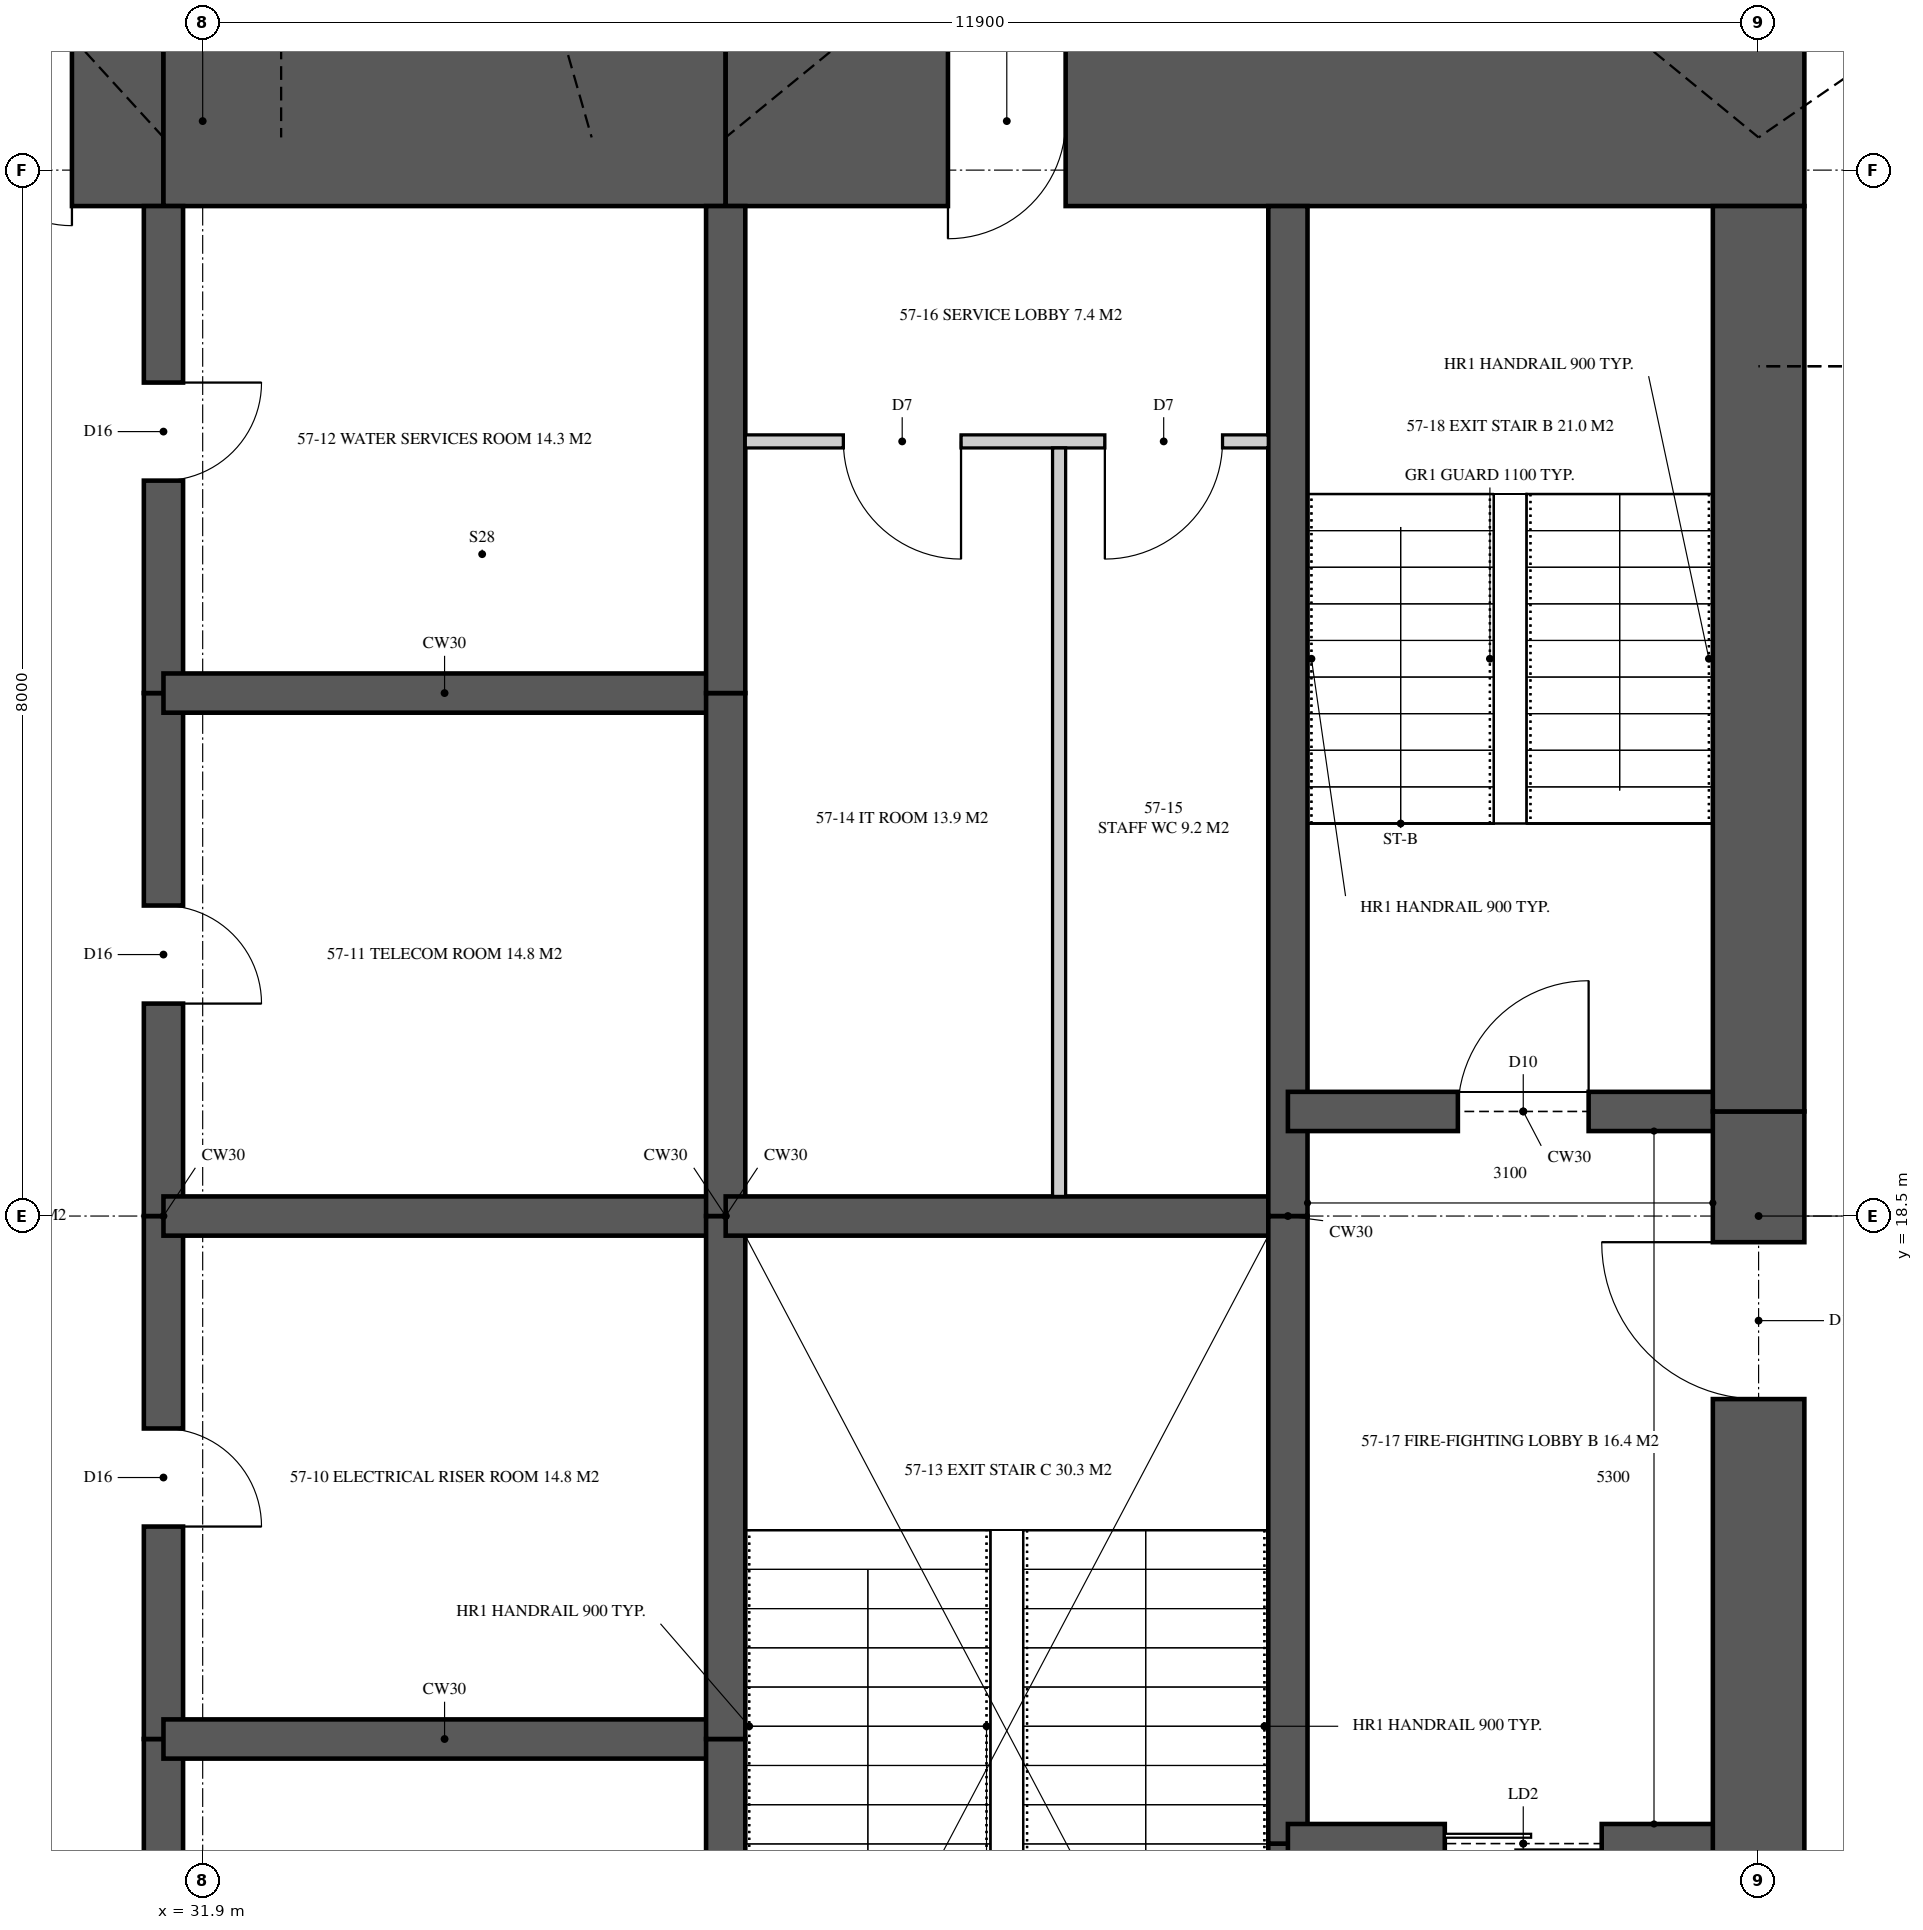
"""IFC4 building model, lengths in metres.
Left out: names, types, materials, properties, quantities, classifications, styles, units other than length and angle.
Written with IfcOpenShell. Run it as: python <this file> out.ifc"""

import sys

from ifc_helpers import new_model, si_unit, direction, frame, frame_2d, origin, place, context, subcontext, project, spatial, rectangle, extrude, element, fill, save


model = new_model("IFC4")
c1 = context("Model", 3, precision=1e-05, world=origin(), true_north=direction((0.0, 1.0)))
c2 = subcontext(c1, "Body", "Model", "MODEL_VIEW")
j1 = project(units=[si_unit("LENGTHUNIT", "METRE"), si_unit("PLANEANGLEUNIT", "RADIAN")], contexts=[c1])
p1 = place(None, origin())
s1 = spatial("IfcSite", under=j1, at=p1, CompositionType="ELEMENT")
p2 = place(p1, origin())
s2 = spatial("IfcBuilding", under=s1, at=p2, CompositionType="ELEMENT")
p3 = place(p2, frame((0.0, 0.0, 207.95)))
s3 = spatial("IfcBuildingStorey", under=s2, at=p3, CompositionType="ELEMENT", Elevation=207.95)
p4 = place(p3, frame((44.15, 26.875, 0.0), z_axis=(0.0, 0.0, 1.0), x_axis=(-1.0, 0.0, 0.0)))
e1 = element("IfcWall", 1, at=p4, inside=s3, PredefinedType="SHEAR", context=c2, shape_type="SweptSolid", body=[
    extrude(rectangle(XDim=8.25, YDim=1.3, at=frame_2d((4.125, 0.0))), origin(), (0.0, 0.0, 1.0), 5.0),
])
p5 = place(p4, frame((5.65, 0.0, 0.0)))
e2 = element("IfcOpeningElement", 2, at=p5, cuts=e1, PredefinedType="OPENING", context=c2, shape_type="SweptSolid", body=[
    extrude(rectangle(XDim=0.9, YDim=2.1, at=frame_2d((0.45, 1.05))), frame((0.0, 0.66, 0.0), z_axis=(0.0, -1.0, 0.0), x_axis=(1.0, 0.0, 0.0)), (0.0, 0.0, 1.0), 1.32),
])
p6 = place(p3, frame((35.9, 26.875, 0.0), z_axis=(0.0, 0.0, 1.0), x_axis=(-1.0, 0.0, 0.0)))
e3 = element("IfcWall", 3, at=p6, inside=s3, PredefinedType="SHEAR", context=c2, shape_type="SweptSolid", body=[
    extrude(rectangle(XDim=4.3, YDim=1.3, at=frame_2d((2.15, 0.0))), origin(), (0.0, 0.0, 1.0), 5.0),
])
p7 = place(p3, frame((31.6, 26.875, 0.0), z_axis=(0.0, 0.0, 1.0), x_axis=(-1.0, 0.0, 0.0)))
e4 = element("IfcWall", 4, at=p7, inside=s3, PredefinedType="SHEAR", context=c2, shape_type="SweptSolid", body=[
    extrude(rectangle(XDim=5.6, YDim=1.3, at=frame_2d((2.8, 0.0))), origin(), (0.0, 0.0, 1.0), 5.0),
])
p8 = place(p7, frame((0.7, 0.0, 0.0)))
e5 = element("IfcOpeningElement", 5, at=p8, cuts=e4, PredefinedType="OPENING", context=c2, shape_type="SweptSolid", body=[
    extrude(rectangle(XDim=1.6, YDim=2.1, at=frame_2d((0.8, 1.05))), frame((0.0, 0.66, 0.0), z_axis=(0.0, -1.0, 0.0), x_axis=(1.0, 0.0, 0.0)), (0.0, 0.0, 1.0), 1.32),
])
p9 = place(p3, frame((43.8, 13.0, 0.0), z_axis=(0.0, 0.0, 1.0), x_axis=(0.0, 1.0, 0.0)))
e6 = element("IfcWall", 6, at=p9, inside=s3, PredefinedType="SHEAR", context=c2, shape_type="SweptSolid", body=[
    extrude(rectangle(XDim=6.3, YDim=0.7, at=frame_2d((3.15, 0.0))), origin(), (0.0, 0.0, 1.0), 5.0),
])
p10 = place(p9, frame((4.1, 0.0, 0.0)))
e7 = element("IfcOpeningElement", 7, at=p10, cuts=e6, PredefinedType="OPENING", context=c2, shape_type="SweptSolid", body=[
    extrude(rectangle(XDim=1.2, YDim=2.2, at=frame_2d((0.6, 1.1))), frame((0.0, 0.36, 0.0), z_axis=(0.0, -1.0, 0.0), x_axis=(1.0, 0.0, 0.0)), (0.0, 0.0, 1.0), 0.72),
])
p11 = place(p3, frame((43.8, 19.3, 0.0), z_axis=(0.0, 0.0, 1.0), x_axis=(0.0, 1.0, 0.0)))
e8 = element("IfcWall", 8, at=p11, inside=s3, PredefinedType="SHEAR", context=c2, shape_type="SweptSolid", body=[
    extrude(rectangle(XDim=6.925, YDim=0.7, at=frame_2d((3.462, 0.0))), origin(), (0.0, 0.0, 1.0), 5.0),
])
p12 = place(p3, frame((31.6, 10.775, 0.0), z_axis=(0.0, 0.0, 1.0), x_axis=(0.0, 1.0, 0.0)))
e9 = element("IfcWall", 9, at=p12, inside=s3, PredefinedType="SHEAR", context=c2, shape_type="SweptSolid", body=[
    extrude(rectangle(XDim=3.725, YDim=0.3, at=frame_2d((1.863, 0.0))), origin(), (0.0, 0.0, 1.0), 5.0),
])
p13 = place(p12, frame((1.35, 0.0, 0.0)))
e10 = element("IfcOpeningElement", 10, at=p13, cuts=e9, PredefinedType="OPENING", context=c2, shape_type="SweptSolid", body=[
    extrude(rectangle(XDim=0.75, YDim=2.1, at=frame_2d((0.375, 1.05))), frame((0.0, 0.16, 0.0), z_axis=(0.0, -1.0, 0.0), x_axis=(1.0, 0.0, 0.0)), (0.0, 0.0, 1.0), 0.32),
])
p14 = place(p3, frame((31.6, 14.5, 0.0), z_axis=(0.0, 0.0, 1.0), x_axis=(0.0, 1.0, 0.0)))
e11 = element("IfcWall", 11, at=p14, inside=s3, PredefinedType="SHEAR", context=c2, shape_type="SweptSolid", body=[
    extrude(rectangle(XDim=4.0, YDim=0.3, at=frame_2d((2.0, 0.0))), origin(), (0.0, 0.0, 1.0), 5.0),
])
p15 = place(p14, frame((1.625, 0.0, 0.0)))
e12 = element("IfcOpeningElement", 12, at=p15, cuts=e11, PredefinedType="OPENING", context=c2, shape_type="SweptSolid", body=[
    extrude(rectangle(XDim=0.75, YDim=2.1, at=frame_2d((0.375, 1.05))), frame((0.0, 0.16, 0.0), z_axis=(0.0, -1.0, 0.0), x_axis=(1.0, 0.0, 0.0)), (0.0, 0.0, 1.0), 0.32),
])
p16 = place(p3, frame((31.6, 18.5, 0.0), z_axis=(0.0, 0.0, 1.0), x_axis=(0.0, 1.0, 0.0)))
e13 = element("IfcWall", 13, at=p16, inside=s3, PredefinedType="SHEAR", context=c2, shape_type="SweptSolid", body=[
    extrude(rectangle(XDim=4.0, YDim=0.3, at=frame_2d((2.0, 0.0))), origin(), (0.0, 0.0, 1.0), 5.0),
])
p17 = place(p16, frame((1.625, 0.0, 0.0)))
e14 = element("IfcOpeningElement", 14, at=p17, cuts=e13, PredefinedType="OPENING", context=c2, shape_type="SweptSolid", body=[
    extrude(rectangle(XDim=0.75, YDim=2.1, at=frame_2d((0.375, 1.05))), frame((0.0, 0.16, 0.0), z_axis=(0.0, -1.0, 0.0), x_axis=(1.0, 0.0, 0.0)), (0.0, 0.0, 1.0), 0.32),
])
p18 = place(p3, frame((31.6, 22.5, 0.0), z_axis=(0.0, 0.0, 1.0), x_axis=(0.0, 1.0, 0.0)))
e15 = element("IfcWall", 15, at=p18, inside=s3, PredefinedType="SHEAR", context=c2, shape_type="SweptSolid", body=[
    extrude(rectangle(XDim=3.725, YDim=0.3, at=frame_2d((1.863, 0.0))), origin(), (0.0, 0.0, 1.0), 5.0),
])
p19 = place(p18, frame((1.625, 0.0, 0.0)))
e16 = element("IfcOpeningElement", 16, at=p19, cuts=e15, PredefinedType="OPENING", context=c2, shape_type="SweptSolid", body=[
    extrude(rectangle(XDim=0.75, YDim=2.1, at=frame_2d((0.375, 1.05))), frame((0.0, 0.16, 0.0), z_axis=(0.0, -1.0, 0.0), x_axis=(1.0, 0.0, 0.0)), (0.0, 0.0, 1.0), 0.32),
])
p20 = place(p3, frame((35.9, 10.775, 0.0), z_axis=(0.0, 0.0, 1.0), x_axis=(0.0, 1.0, 0.0)))
e17 = element("IfcWall", 17, at=p20, inside=s3, PredefinedType="SHEAR", context=c2, shape_type="SweptSolid", body=[
    extrude(rectangle(XDim=3.725, YDim=0.3, at=frame_2d((1.863, 0.0))), origin(), (0.0, 0.0, 1.0), 5.0),
])
for number, where, z_axis, x_axis in (
    (18, (35.9, 14.5, 0.0), (0.0, 0.0, 1.0), (0.0, 1.0, 0.0)),
    (19, (35.9, 18.5, 0.0), (0.0, 0.0, 1.0), (0.0, 1.0, 0.0)),
):
    element("IfcWall", number, at=place(p3, frame(where, z_axis=z_axis, x_axis=x_axis)), inside=s3, PredefinedType="SHEAR", context=c2, shape_type="SweptSolid", body=[
        extrude(rectangle(XDim=4.0, YDim=0.3, at=frame_2d((2.0, 0.0))), origin(), (0.0, 0.0, 1.0), 5.0),
    ])
p21 = place(p3, frame((35.9, 22.5, 0.0), z_axis=(0.0, 0.0, 1.0), x_axis=(0.0, 1.0, 0.0)))
e20 = element("IfcWall", 20, at=p21, inside=s3, PredefinedType="SHEAR", context=c2, shape_type="SweptSolid", body=[
    extrude(rectangle(XDim=3.725, YDim=0.3, at=frame_2d((1.863, 0.0))), origin(), (0.0, 0.0, 1.0), 5.0),
])
p22 = place(p3, frame((40.2, 10.775, 0.0), z_axis=(0.0, 0.0, 1.0), x_axis=(0.0, 1.0, 0.0)))
e21 = element("IfcWall", 21, at=p22, inside=s3, PredefinedType="SHEAR", context=c2, shape_type="SweptSolid", body=[
    extrude(rectangle(XDim=2.925, YDim=0.3, at=frame_2d((1.462, 0.0))), origin(), (0.0, 0.0, 1.0), 5.0),
])
p23 = place(p3, frame((40.2, 13.7, 0.0), z_axis=(0.0, 0.0, 1.0), x_axis=(0.0, 1.0, 0.0)))
e22 = element("IfcWall", 22, at=p23, inside=s3, PredefinedType="SHEAR", context=c2, shape_type="SweptSolid", body=[
    extrude(rectangle(XDim=4.8, YDim=0.3, at=frame_2d((2.4, 0.0))), origin(), (0.0, 0.0, 1.0), 5.0),
])
p24 = place(p3, frame((40.2, 18.5, 0.0), z_axis=(0.0, 0.0, 1.0), x_axis=(0.0, 1.0, 0.0)))
e23 = element("IfcWall", 23, at=p24, inside=s3, PredefinedType="SHEAR", context=c2, shape_type="SweptSolid", body=[
    extrude(rectangle(XDim=7.725, YDim=0.3, at=frame_2d((3.863, 0.0))), origin(), (0.0, 0.0, 1.0), 5.0),
])
for number, where, z_axis, x_axis in (
    (24, (31.6, 14.5, 0.0), (0.0, 0.0, 1.0), (1.0, 0.0, 0.0)),
    (25, (31.6, 18.5, 0.0), (0.0, 0.0, 1.0), (1.0, 0.0, 0.0)),
    (26, (31.6, 22.5, 0.0), (0.0, 0.0, 1.0), (1.0, 0.0, 0.0)),
):
    element("IfcWall", number, at=place(p3, frame(where, z_axis=z_axis, x_axis=x_axis)), inside=s3, PredefinedType="SHEAR", context=c2, shape_type="SweptSolid", body=[
        extrude(rectangle(XDim=4.3, YDim=0.3, at=frame_2d((2.15, 0.0))), origin(), (0.0, 0.0, 1.0), 5.0),
    ])
p25 = place(p3, frame((35.9, 18.5, 0.0), z_axis=(0.0, 0.0, 1.0), x_axis=(1.0, 0.0, 0.0)))
e27 = element("IfcWall", 27, at=p25, inside=s3, PredefinedType="SHEAR", context=c2, shape_type="SweptSolid", body=[
    extrude(rectangle(XDim=4.3, YDim=0.3, at=frame_2d((2.15, 0.0))), origin(), (0.0, 0.0, 1.0), 5.0),
])
p26 = place(p3, frame((40.2, 13.7, 0.0), z_axis=(0.0, 0.0, 1.0), x_axis=(1.0, 0.0, 0.0)))
e28 = element("IfcWall", 28, at=p26, inside=s3, PredefinedType="SHEAR", context=c2, shape_type="SweptSolid", body=[
    extrude(rectangle(XDim=3.6, YDim=0.3, at=frame_2d((1.8, 0.0))), origin(), (0.0, 0.0, 1.0), 5.0),
])
p27 = place(p26, frame((1.2, 0.0, 0.0)))
e29 = element("IfcOpeningElement", 29, at=p27, cuts=e28, PredefinedType="OPENING", context=c2, shape_type="SweptSolid", body=[
    extrude(rectangle(XDim=1.2, YDim=2.1, at=frame_2d((0.6, 1.05))), frame((0.0, 0.16, 0.0), z_axis=(0.0, -1.0, 0.0), x_axis=(1.0, 0.0, 0.0)), (0.0, 0.0, 1.0), 0.32),
])
p28 = place(p3, frame((40.2, 19.3, 0.0), z_axis=(0.0, 0.0, 1.0), x_axis=(1.0, 0.0, 0.0)))
e30 = element("IfcWall", 30, at=p28, inside=s3, PredefinedType="SHEAR", context=c2, shape_type="SweptSolid", body=[
    extrude(rectangle(XDim=3.6, YDim=0.3, at=frame_2d((1.8, 0.0))), origin(), (0.0, 0.0, 1.0), 5.0),
])
p29 = place(p28, frame((1.3, 0.0, 0.0)))
e31 = element("IfcOpeningElement", 31, at=p29, cuts=e30, PredefinedType="OPENING", context=c2, shape_type="SweptSolid", body=[
    extrude(rectangle(XDim=1.0, YDim=2.1, at=frame_2d((0.5, 1.05))), frame((0.0, 0.16, 0.0), z_axis=(0.0, -1.0, 0.0), x_axis=(1.0, 0.0, 0.0)), (0.0, 0.0, 1.0), 0.32),
])
p30 = place(p3, frame((36.05, 24.425, 0.0), z_axis=(0.0, 0.0, 1.0), x_axis=(1.0, 0.0, 0.0)))
e32 = element("IfcWall", 32, at=p30, inside=s3, PredefinedType="PARTITIONING", context=c2, shape_type="SweptSolid", body=[
    extrude(rectangle(XDim=4.0, YDim=0.1, at=frame_2d((2.0, 0.0))), origin(), (0.0, 0.0, 1.0), 4.72),
])
p31 = place(p30, frame((0.75, 0.0, 0.0)))
e33 = element("IfcOpeningElement", 33, at=p31, cuts=e32, PredefinedType="OPENING", context=c2, shape_type="SweptSolid", body=[
    extrude(rectangle(XDim=0.9, YDim=2.1, at=frame_2d((0.45, 1.05))), frame((0.0, 0.06, 0.0), z_axis=(0.0, -1.0, 0.0), x_axis=(1.0, 0.0, 0.0)), (0.0, 0.0, 1.0), 0.12),
])
p32 = place(p30, frame((2.75, 0.0, 0.0)))
e34 = element("IfcOpeningElement", 34, at=p32, cuts=e32, PredefinedType="OPENING", context=c2, shape_type="SweptSolid", body=[
    extrude(rectangle(XDim=0.9, YDim=2.1, at=frame_2d((0.45, 1.05))), frame((0.0, 0.06, 0.0), z_axis=(0.0, -1.0, 0.0), x_axis=(1.0, 0.0, 0.0)), (0.0, 0.0, 1.0), 0.12),
])
p33 = place(p3, frame((38.45, 18.65, 0.0), z_axis=(0.0, 0.0, 1.0), x_axis=(0.0, 1.0, 0.0)))
e35 = element("IfcWall", 35, at=p33, inside=s3, PredefinedType="PARTITIONING", context=c2, shape_type="SweptSolid", body=[
    extrude(rectangle(XDim=5.725, YDim=0.1, at=frame_2d((2.863, 0.0))), origin(), (0.0, 0.0, 1.0), 4.72),
])
p34 = place(p31, frame((0.9, 0.0, 0.0), z_axis=(0.0, 0.0, 1.0), x_axis=(-1.0, 0.0, 0.0)))
e36 = element("IfcDoor", 36, at=p34, inside=s3, OperationType="SINGLE_SWING_LEFT", PredefinedType="DOOR", context=c2, shape_type="SweptSolid", body=[
    extrude(rectangle(XDim=0.9, YDim=2.1, at=frame_2d((0.45, 1.05))), frame((0.0, 0.025, 0.0), z_axis=(0.0, -1.0, 0.0), x_axis=(1.0, 0.0, 0.0)), (0.0, 0.0, 1.0), 0.05),
])
fill(e33, e36)
p35 = place(p32, frame((0.9, 0.0, 0.0), z_axis=(0.0, 0.0, 1.0), x_axis=(-1.0, 0.0, 0.0)))
e37 = element("IfcDoor", 37, at=p35, inside=s3, OperationType="SINGLE_SWING_RIGHT", PredefinedType="DOOR", context=c2, shape_type="SweptSolid", body=[
    extrude(rectangle(XDim=0.9, YDim=2.1, at=frame_2d((0.45, 1.05))), frame((0.0, 0.025, 0.0), z_axis=(0.0, -1.0, 0.0), x_axis=(1.0, 0.0, 0.0)), (0.0, 0.0, 1.0), 0.05),
])
fill(e34, e37)
p36 = place(p29, origin())
e38 = element("IfcDoor", 38, at=p36, inside=s3, OperationType="SINGLE_SWING_RIGHT", PredefinedType="DOOR", context=c2, shape_type="SweptSolid", body=[
    extrude(rectangle(XDim=1.0, YDim=2.1, at=frame_2d((0.5, 1.05))), frame((0.0, 0.025, 0.0), z_axis=(0.0, -1.0, 0.0), x_axis=(1.0, 0.0, 0.0)), (0.0, 0.0, 1.0), 0.05),
])
fill(e31, e38)
p37 = place(p10, origin())
e39 = element("IfcDoor", 39, at=p37, inside=s3, OperationType="SINGLE_SWING_RIGHT", PredefinedType="DOOR", context=c2, shape_type="SweptSolid", body=[
    extrude(rectangle(XDim=1.2, YDim=2.2, at=frame_2d((0.6, 1.1))), frame((0.0, 0.025, 0.0), z_axis=(0.0, -1.0, 0.0), x_axis=(1.0, 0.0, 0.0)), (0.0, 0.0, 1.0), 0.05),
])
fill(e7, e39)
p38 = place(p27, origin())
e40 = element("IfcDoor", 40, at=p38, inside=s3, OperationType="SLIDING_TO_LEFT", PredefinedType="DOOR", context=c2, shape_type="SweptSolid", body=[
    extrude(rectangle(XDim=1.2, YDim=2.1, at=frame_2d((0.6, 1.05))), frame((0.0, 0.025, 0.0), z_axis=(0.0, -1.0, 0.0), x_axis=(1.0, 0.0, 0.0)), (0.0, 0.0, 1.0), 0.05),
])
fill(e29, e40)
p39 = place(p8, origin())
e41 = element("IfcDoor", 41, at=p39, inside=s3, OperationType="DOUBLE_DOOR_SINGLE_SWING", PredefinedType="DOOR", context=c2, shape_type="SweptSolid", body=[
    extrude(rectangle(XDim=1.6, YDim=2.1, at=frame_2d((0.8, 1.05))), frame((0.0, 0.025, 0.0), z_axis=(0.0, -1.0, 0.0), x_axis=(1.0, 0.0, 0.0)), (0.0, 0.0, 1.0), 0.05),
])
fill(e5, e41)
p40 = place(p15, frame((0.75, 0.0, 0.0), z_axis=(0.0, 0.0, 1.0), x_axis=(-1.0, 0.0, 0.0)))
e42 = element("IfcDoor", 42, at=p40, inside=s3, OperationType="SINGLE_SWING_RIGHT", PredefinedType="DOOR", context=c2, shape_type="SweptSolid", body=[
    extrude(rectangle(XDim=0.75, YDim=2.1, at=frame_2d((0.375, 1.05))), frame((0.0, 0.025, 0.0), z_axis=(0.0, -1.0, 0.0), x_axis=(1.0, 0.0, 0.0)), (0.0, 0.0, 1.0), 0.05),
])
fill(e12, e42)
p41 = place(p17, frame((0.75, 0.0, 0.0), z_axis=(0.0, 0.0, 1.0), x_axis=(-1.0, 0.0, 0.0)))
e43 = element("IfcDoor", 43, at=p41, inside=s3, OperationType="SINGLE_SWING_RIGHT", PredefinedType="DOOR", context=c2, shape_type="SweptSolid", body=[
    extrude(rectangle(XDim=0.75, YDim=2.1, at=frame_2d((0.375, 1.05))), frame((0.0, 0.025, 0.0), z_axis=(0.0, -1.0, 0.0), x_axis=(1.0, 0.0, 0.0)), (0.0, 0.0, 1.0), 0.05),
])
fill(e14, e43)
p42 = place(p19, frame((0.75, 0.0, 0.0), z_axis=(0.0, 0.0, 1.0), x_axis=(-1.0, 0.0, 0.0)))
e44 = element("IfcDoor", 44, at=p42, inside=s3, OperationType="SINGLE_SWING_LEFT", PredefinedType="DOOR", context=c2, shape_type="SweptSolid", body=[
    extrude(rectangle(XDim=0.75, YDim=2.1, at=frame_2d((0.375, 1.05))), frame((0.0, 0.025, 0.0), z_axis=(0.0, -1.0, 0.0), x_axis=(1.0, 0.0, 0.0)), (0.0, 0.0, 1.0), 0.05),
])
fill(e16, e44)
p43 = place(p5, origin())
e45 = element("IfcDoor", 45, at=p43, inside=s3, OperationType="SINGLE_SWING_RIGHT", PredefinedType="DOOR", context=c2, shape_type="SweptSolid", body=[
    extrude(rectangle(XDim=0.9, YDim=2.1, at=frame_2d((0.45, 1.05))), frame((0.0, 0.47, 0.0), z_axis=(0.0, -1.0, 0.0), x_axis=(1.0, 0.0, 0.0)), (0.0, 0.0, 1.0), 0.8),
])
fill(e2, e45)
save(model, sys.argv[1])
